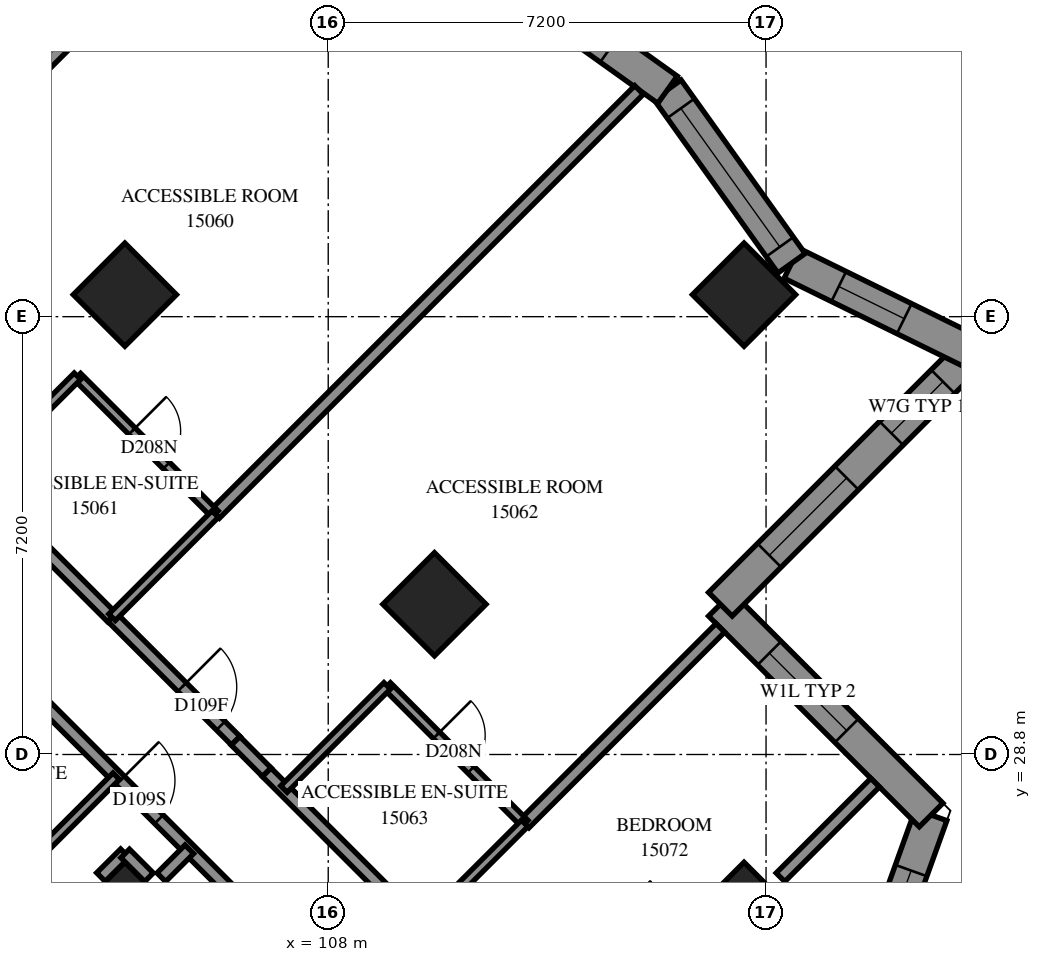
"""IFC4 building model, lengths in metres.
Left out: names, types, materials, properties, quantities, classifications, styles, units other than length and angle.
Written with IfcOpenShell. Run it as: python <this file> out.ifc"""

import sys

from ifc_helpers import new_model, si_unit, direction, frame, frame_2d, origin, origin_2d, place, context, subcontext, project, spatial, polyline, rectangle, outline, extrude, element, fill, save


model = new_model("IFC4")
c1 = context("Model", 3, precision=1e-05, world=origin(), true_north=direction((0.0, 1.0)))
c2 = subcontext(c1, "Body", "Model", "MODEL_VIEW")
j1 = project(units=[si_unit("LENGTHUNIT", "METRE"), si_unit("PLANEANGLEUNIT", "RADIAN")], contexts=[c1])
p1 = place(None, origin())
s1 = spatial("IfcSite", under=j1, at=p1, CompositionType="ELEMENT")
p2 = place(p1, origin())
s2 = spatial("IfcBuilding", under=s1, at=p2, CompositionType="ELEMENT")
p3 = place(p2, frame((0.0, 0.0, 57.6)))
s3 = spatial("IfcBuildingStorey", under=s2, at=p3, CompositionType="ELEMENT", Elevation=57.6)
for number, where, z_axis, x_axis in (
    (1, (104.656, 36.362, 0.0), (0.0, 0.0, 1.0), (0.707, -0.707, 0.0)),
    (2, (114.838, 36.362, 0.0), (0.0, 0.0, 1.0), (0.707, -0.707, 0.0)),
    (3, (109.747, 31.271, 0.0), (0.0, 0.0, 1.0), (0.707, -0.707, 0.0)),
    (4, (104.656, 26.18, 0.0), (0.0, 0.0, 1.0), (0.707, -0.707, 0.0)),
    (5, (114.838, 26.18, 0.0), (0.0, 0.0, 1.0), (0.707, -0.707, 0.0)),
):
    element("IfcColumn", number, at=place(p3, frame(where, z_axis=z_axis, x_axis=x_axis)), inside=s3, PredefinedType="COLUMN", context=c2, shape_type="SweptSolid", body=[
        extrude(rectangle(XDim=1.2, YDim=1.2, at=origin_2d()), origin(), (0.0, 0.0, 1.0), 3.1),
    ])
p4 = place(p3, frame((116.111, 22.788, 0.0), z_axis=(0.0, 0.0, 1.0), x_axis=(0.3382272757, 0.9410644558, 0.0)))
e6 = element("IfcWall", 6, at=p4, inside=s3, PredefinedType="SOLIDWALL", context=c2, shape_type="SweptSolid", body=[
    extrude(outline(polyline([(-0.124, -0.275), (5.506, -0.275), (5.157, 0.275), (0.124, 0.275), (-0.124, -0.275)])), origin(), (0.0, 0.0, 1.0), 3.1),
])
p5 = place(p4, frame((0.844, 0.0, 0.5)))
e7 = element("IfcOpeningElement", 7, at=p5, cuts=e6, PredefinedType="OPENING", context=c2, shape_type="SweptSolid", body=[
    extrude(rectangle(XDim=1.2, YDim=2.45, at=frame_2d((0.6, 1.225))), frame((0.0, 0.285, 0.0), z_axis=(0.0, -1.0, 0.0), x_axis=(1.0, 0.0, 0.0)), (0.0, 0.0, 1.0), 0.57),
])
p6 = place(p4, frame((3.16, 0.0, 0.5)))
e8 = element("IfcOpeningElement", 8, at=p6, cuts=e6, PredefinedType="OPENING", context=c2, shape_type="SweptSolid", body=[
    extrude(rectangle(XDim=1.2, YDim=2.45, at=frame_2d((0.6, 1.225))), frame((0.0, 0.285, 0.0), z_axis=(0.0, -1.0, 0.0), x_axis=(1.0, 0.0, 0.0)), (0.0, 0.0, 1.0), 0.57),
])
p7 = place(p3, frame((117.915, 27.805, 0.0), z_axis=(0.0, 0.0, 1.0), x_axis=(-0.7071067812, 0.7071067812, 0.0)))
e9 = element("IfcWall", 9, at=p7, inside=s3, PredefinedType="SOLIDWALL", context=c2, shape_type="SweptSolid", body=[
    extrude(outline(polyline([(-0.174, -0.275), (4.626, -0.275), (5.176, 0.275), (0.174, 0.275), (-0.174, -0.275)])), origin(), (0.0, 0.0, 1.0), 3.1),
])
p8 = place(p7, frame((1.963, 0.0, 0.6)))
e10 = element("IfcOpeningElement", 10, at=p8, cuts=e9, PredefinedType="OPENING", context=c2, shape_type="SweptSolid", body=[
    extrude(rectangle(XDim=1.8, YDim=1.9, at=frame_2d((0.9, 0.95))), frame((0.0, 0.285, 0.0), z_axis=(0.0, -1.0, 0.0), x_axis=(1.0, 0.0, 0.0)), (0.0, 0.0, 1.0), 0.57),
])
p9 = place(p3, frame((114.449, 31.271, 0.0), z_axis=(0.0, 0.0, 1.0), x_axis=(0.7070982526, 0.7071153096, 0.0)))
e11 = element("IfcWall", 11, at=p9, inside=s3, PredefinedType="SOLIDWALL", context=c2, shape_type="SweptSolid", body=[
    extrude(outline(polyline([(0.275, -0.275), (6.247, -0.275), (5.478, 0.275), (-0.275, 0.275), (0.275, -0.275)])), origin(), (0.0, 0.0, 1.0), 3.1),
])
p10 = place(p9, frame((1.137, 0.0, 0.6)))
e12 = element("IfcOpeningElement", 12, at=p10, cuts=e11, PredefinedType="OPENING", context=c2, shape_type="SweptSolid", body=[
    extrude(rectangle(XDim=1.8, YDim=1.9, at=frame_2d((0.9, 0.95))), frame((0.0, 0.285, 0.0), z_axis=(0.0, -1.0, 0.0), x_axis=(1.0, 0.0, 0.0)), (0.0, 0.0, 1.0), 0.57),
])
p11 = place(p9, frame((3.977, 0.0, 0.6)))
e13 = element("IfcOpeningElement", 13, at=p11, cuts=e11, PredefinedType="OPENING", context=c2, shape_type="SweptSolid", body=[
    extrude(rectangle(XDim=1.2, YDim=1.9, at=frame_2d((0.6, 0.95))), frame((0.0, 0.285, 0.0), z_axis=(0.0, -1.0, 0.0), x_axis=(1.0, 0.0, 0.0)), (0.0, 0.0, 1.0), 0.57),
])
p12 = place(p3, frame((118.595, 35.416, 0.0), z_axis=(0.0, 0.0, 1.0), x_axis=(-0.8975000889, 0.4410142747, 0.0)))
e14 = element("IfcWall", 14, at=p12, inside=s3, PredefinedType="SOLIDWALL", context=c2, shape_type="SweptSolid", body=[
    extrude(outline(polyline([(-0.384, -0.275), (3.246, -0.275), (3.385, 0.275), (0.384, 0.275), (-0.384, -0.275)])), origin(), (0.0, 0.0, 1.0), 3.1),
])
p13 = place(p12, frame((1.25, 0.0, 0.5)))
e15 = element("IfcOpeningElement", 15, at=p13, cuts=e14, PredefinedType="OPENING", context=c2, shape_type="SweptSolid", body=[
    extrude(rectangle(XDim=1.2, YDim=2.45, at=frame_2d((0.6, 1.225))), frame((0.0, 0.285, 0.0), z_axis=(0.0, -1.0, 0.0), x_axis=(1.0, 0.0, 0.0)), (0.0, 0.0, 1.0), 0.57),
])
p14 = place(p3, frame((115.619, 36.879, 0.0), z_axis=(0.0, 0.0, 1.0), x_axis=(-0.5814054054, 0.8136140083, 0.0)))
e16 = element("IfcWall", 16, at=p14, inside=s3, PredefinedType="SOLIDWALL", context=c2, shape_type="SweptSolid", body=[
    extrude(outline(polyline([(0.069, -0.275), (3.553, -0.275), (3.461, 0.275), (-0.069, 0.275), (0.069, -0.275)])), origin(), (0.0, 0.0, 1.0), 3.1),
])
p15 = place(p14, frame((0.331, 0.0, 0.5)))
e17 = element("IfcOpeningElement", 17, at=p15, cuts=e16, PredefinedType="OPENING", context=c2, shape_type="SweptSolid", body=[
    extrude(rectangle(XDim=2.8, YDim=2.45, at=frame_2d((1.4, 1.225))), frame((0.0, 0.285, 0.0), z_axis=(0.0, -1.0, 0.0), x_axis=(1.0, 0.0, 0.0)), (0.0, 0.0, 1.0), 0.57),
])
p16 = place(p3, frame((113.58, 39.732, 0.0), z_axis=(0.0, 0.0, 1.0), x_axis=(-0.8136209625, 0.5813956737, 0.0)))
e18 = element("IfcWall", 18, at=p16, inside=s3, PredefinedType="SOLIDWALL", context=c2, shape_type="SweptSolid", body=[
    extrude(outline(polyline([(-0.046, -0.275), (3.438, -0.275), (3.53, 0.275), (0.046, 0.275), (-0.046, -0.275)])), origin(), (0.0, 0.0, 1.0), 3.1),
])
p17 = place(p16, frame((1.165, 0.0, 0.5)))
e19 = element("IfcOpeningElement", 19, at=p17, cuts=e18, PredefinedType="OPENING", context=c2, shape_type="SweptSolid", body=[
    extrude(rectangle(XDim=1.2, YDim=2.45, at=frame_2d((0.6, 1.225))), frame((0.0, 0.285, 0.0), z_axis=(0.0, -1.0, 0.0), x_axis=(1.0, 0.0, 0.0)), (0.0, 0.0, 1.0), 0.57),
])
p18 = place(p3, frame((101.825, 31.125, 0.0), z_axis=(0.0, 0.0, 1.0), x_axis=(0.7071067812, -0.7071067812, 0.0)))
e20 = element("IfcWall", 20, at=p18, inside=s3, PredefinedType="PARTITIONING", context=c2, shape_type="SweptSolid", body=[
    extrude(rectangle(XDim=12.7, YDim=0.2, at=frame_2d((6.35, 0.0))), origin(), (0.0, 0.0, 1.0), 3.1),
])
p19 = place(p18, frame((3.895, 0.0, 0.0)))
e21 = element("IfcOpeningElement", 21, at=p19, cuts=e20, PredefinedType="OPENING", context=c2, shape_type="SweptSolid", body=[
    extrude(rectangle(XDim=0.9, YDim=2.1, at=frame_2d((0.45, 1.05))), frame((0.0, 0.11, 0.0), z_axis=(0.0, -1.0, 0.0), x_axis=(1.0, 0.0, 0.0)), (0.0, 0.0, 1.0), 0.22),
])
p20 = place(p18, frame((9.056, 0.0, 0.0)))
e22 = element("IfcOpeningElement", 22, at=p20, cuts=e20, PredefinedType="OPENING", context=c2, shape_type="SweptSolid", body=[
    extrude(rectangle(XDim=1.0, YDim=2.1, at=frame_2d((0.5, 1.05))), frame((0.0, 0.11, 0.0), z_axis=(0.0, -1.0, 0.0), x_axis=(1.0, 0.0, 0.0)), (0.0, 0.0, 1.0), 0.22),
])
p21 = place(p3, frame((106.14, 32.756, 0.0), z_axis=(0.0, 0.0, 1.0), x_axis=(0.7071067812, 0.7071067812, 0.0)))
e23 = element("IfcWall", 23, at=p21, inside=s3, PredefinedType="PARTITIONING", context=c2, shape_type="SweptSolid", body=[
    extrude(rectangle(XDim=9.86, YDim=0.2, at=frame_2d((4.93, 0.0))), origin(), (0.0, 0.0, 1.0), 3.1),
])
p22 = place(p3, frame((101.049, 37.847, 0.0), z_axis=(0.0, 0.0, 1.0), x_axis=(0.7071067812, 0.7071067812, 0.0)))
e24 = element("IfcWall", 24, at=p22, inside=s3, PredefinedType="PARTITIONING", context=c2, shape_type="SweptSolid", body=[
    extrude(rectangle(XDim=9.806, YDim=0.2, at=frame_2d((4.903, 0.0))), origin(), (0.0, 0.0, 1.0), 3.1),
])
p23 = place(p3, frame((99.349, 36.147, 0.0), z_axis=(0.0, 0.0, 1.0), x_axis=(0.7071067812, -0.7071067812, 0.0)))
e25 = element("IfcWall", 25, at=p23, inside=s3, PredefinedType="PARTITIONING", context=c2, shape_type="SweptSolid", body=[
    extrude(rectangle(XDim=7.201, YDim=0.2, at=frame_2d((3.601, 0.0))), origin(), (0.0, 0.0, 1.0), 3.1),
])
p24 = place(p23, frame((2.358, 0.0, 0.0)))
e26 = element("IfcOpeningElement", 26, at=p24, cuts=e25, PredefinedType="OPENING", context=c2, shape_type="SweptSolid", body=[
    extrude(rectangle(XDim=0.9, YDim=2.1, at=frame_2d((0.45, 1.05))), frame((0.0, 0.11, 0.0), z_axis=(0.0, -1.0, 0.0), x_axis=(1.0, 0.0, 0.0)), (0.0, 0.0, 1.0), 0.22),
])
p25 = place(p3, frame((106.987, 28.509, 0.0), z_axis=(0.0, 0.0, 1.0), x_axis=(0.7071067812, -0.7071067812, 0.0)))
e27 = element("IfcWall", 27, at=p25, inside=s3, PredefinedType="PARTITIONING", context=c2, shape_type="SweptSolid", body=[
    extrude(rectangle(XDim=7.198, YDim=0.2, at=frame_2d((3.599, 0.0))), origin(), (0.0, 0.0, 1.0), 3.1),
])
p26 = place(p25, frame((4.004, 0.0, 0.0)))
e28 = element("IfcOpeningElement", 28, at=p26, cuts=e27, PredefinedType="OPENING", context=c2, shape_type="SweptSolid", body=[
    extrude(rectangle(XDim=0.9, YDim=2.1, at=frame_2d((0.45, 1.05))), frame((0.0, 0.11, 0.0), z_axis=(0.0, -1.0, 0.0), x_axis=(1.0, 0.0, 0.0)), (0.0, 0.0, 1.0), 0.22),
])
p27 = place(p3, frame((111.231, 27.665, 0.0), z_axis=(0.0, 0.0, 1.0), x_axis=(0.7071067812, 0.7071067812, 0.0)))
e29 = element("IfcWall", 29, at=p27, inside=s3, PredefinedType="PARTITIONING", context=c2, shape_type="SweptSolid", body=[
    extrude(rectangle(XDim=4.55, YDim=0.2, at=frame_2d((2.275, 0.0))), origin(), (0.0, 0.0, 1.0), 3.1),
])
p28 = place(p3, frame((108.97, 29.928, 0.0), z_axis=(0.0, 0.0, 1.0), x_axis=(0.7067942478, -0.7074191764, 0.0)))
e30 = element("IfcWall", 30, at=p28, inside=s3, PredefinedType="PARTITIONING", context=c2, shape_type="SweptSolid", body=[
    extrude(rectangle(XDim=3.2, YDim=0.15, at=frame_2d((1.6, 0.0))), origin(), (0.0, 0.0, 1.0), 3.1),
])
p29 = place(p28, frame((1.148, 0.0, 0.0)))
e31 = element("IfcOpeningElement", 31, at=p29, cuts=e30, PredefinedType="OPENING", context=c2, shape_type="SweptSolid", body=[
    extrude(rectangle(XDim=0.8, YDim=2.1, at=frame_2d((0.4, 1.05))), frame((0.0, 0.085, 0.0), z_axis=(0.0, -1.0, 0.0), x_axis=(1.0, 0.0, 0.0)), (0.0, 0.0, 1.0), 0.17),
])
p30 = place(p3, frame((103.875, 35.015, 0.0), z_axis=(0.0, 0.0, 1.0), x_axis=(0.7071067812, -0.7071067812, 0.0)))
e32 = element("IfcWall", 32, at=p30, inside=s3, PredefinedType="PARTITIONING", context=c2, shape_type="SweptSolid", body=[
    extrude(rectangle(XDim=3.199, YDim=0.15, at=frame_2d((1.599, 0.0))), origin(), (0.0, 0.0, 1.0), 3.1),
])
p31 = place(p30, frame((1.27, 0.0, 0.0)))
e33 = element("IfcOpeningElement", 33, at=p31, cuts=e32, PredefinedType="OPENING", context=c2, shape_type="SweptSolid", body=[
    extrude(rectangle(XDim=0.8, YDim=2.1, at=frame_2d((0.4, 1.05))), frame((0.0, 0.085, 0.0), z_axis=(0.0, -1.0, 0.0), x_axis=(1.0, 0.0, 0.0)), (0.0, 0.0, 1.0), 0.17),
])
p32 = place(p3, frame((104.445, 31.059, 0.0), z_axis=(0.0, 0.0, 1.0), x_axis=(0.7074545101, -0.7067588812, 0.0)))
e34 = element("IfcWall", 34, at=p32, inside=s3, PredefinedType="PARTITIONING", context=c2, shape_type="SweptSolid", body=[
    extrude(rectangle(XDim=2.875, YDim=0.2, at=frame_2d((1.438, 0.0))), origin(), (0.0, 0.0, 1.0), 3.1),
])
p33 = place(p32, frame((1.626, 0.0, 0.0)))
e35 = element("IfcOpeningElement", 35, at=p33, cuts=e34, PredefinedType="OPENING", context=c2, shape_type="SweptSolid", body=[
    extrude(rectangle(XDim=0.9, YDim=2.1, at=frame_2d((0.45, 1.05))), frame((0.0, 0.11, 0.0), z_axis=(0.0, -1.0, 0.0), x_axis=(1.0, 0.0, 0.0)), (0.0, 0.0, 1.0), 0.22),
])
p34 = place(p3, frame((107.271, 28.231, 0.0), z_axis=(0.0, 0.0, 1.0), x_axis=(0.7071067812, 0.7071067812, 0.0)))
e36 = element("IfcWall", 36, at=p34, inside=s3, PredefinedType="PARTITIONING", context=c2, shape_type="SweptSolid", body=[
    extrude(rectangle(XDim=2.401, YDim=0.15, at=frame_2d((1.201, 0.0))), origin(), (0.0, 0.0, 1.0), 3.1),
])
for number, where, z_axis, x_axis in (
    (37, (104.445, 31.057, 0.0), (0.0, 0.0, 1.0), (0.707, 0.708, 0.0)),
    (38, (102.177, 33.325, 0.0), (0.0, 0.0, 1.0), (0.708, 0.707, 0.0)),
    (39, (109.531, 25.971, 0.0), (0.0, 0.0, 1.0), (0.708, 0.707, 0.0)),
):
    element("IfcWall", number, at=place(p3, frame(where, z_axis=z_axis, x_axis=x_axis)), inside=s3, PredefinedType="PARTITIONING", context=c2, shape_type="SweptSolid", body=[
        extrude(rectangle(XDim=2.4, YDim=0.15, at=frame_2d((1.2, 0.0))), origin(), (0.0, 0.0, 1.0), 3.1),
    ])
p35 = place(p3, frame((102.817, 26.747, 0.0), z_axis=(0.0, 0.0, 1.0), x_axis=(0.7071067812, 0.7071067812, 0.0)))
e40 = element("IfcWall", 40, at=p35, inside=s3, PredefinedType="PARTITIONING", context=c2, shape_type="SweptSolid", body=[
    extrude(rectangle(XDim=2.398, YDim=0.15, at=frame_2d((1.199, 0.0))), origin(), (0.0, 0.0, 1.0), 3.1),
])
p36 = place(p3, frame((115.438, 26.78, 0.0), z_axis=(0.0, 0.0, 1.0), x_axis=(0.7071067812, 0.7071067812, 0.0)))
e41 = element("IfcWall", 41, at=p36, inside=s3, PredefinedType="PARTITIONING", context=c2, shape_type="SweptSolid", body=[
    extrude(rectangle(XDim=2.201, YDim=0.2, at=frame_2d((1.101, 0.0))), origin(), (0.0, 0.0, 1.0), 3.1),
])
p37 = place(p3, frame((106.476, 29.024, 0.0), z_axis=(0.0, 0.0, 1.0), x_axis=(0.7057270646, -0.7084838109, 0.0)))
e42 = element("IfcWall", 42, at=p37, inside=s3, PredefinedType="PARTITIONING", context=c2, shape_type="SweptSolid", body=[
    extrude(rectangle(XDim=0.726, YDim=0.2, at=frame_2d((0.363, 0.0))), origin(), (0.0, 0.0, 1.0), 3.1),
])
p38 = place(p3, frame((105.255, 26.781, 0.0), z_axis=(0.0, 0.0, 1.0), x_axis=(0.7071067812, 0.7071067812, 0.0)))
e43 = element("IfcWall", 43, at=p38, inside=s3, PredefinedType="PARTITIONING", context=c2, shape_type="SweptSolid", body=[
    extrude(rectangle(XDim=0.65, YDim=0.2, at=frame_2d((0.325, 0.0))), origin(), (0.0, 0.0, 1.0), 3.1),
])
p39 = place(p3, frame((104.263, 26.784, 0.0), z_axis=(0.0, 0.0, 1.0), x_axis=(0.7089037401, 0.705305244, 0.0)))
e44 = element("IfcWall", 44, at=p39, inside=s3, PredefinedType="PARTITIONING", context=c2, shape_type="SweptSolid", body=[
    extrude(rectangle(XDim=0.556, YDim=0.2, at=frame_2d((0.278, 0.0))), origin(), (0.0, 0.0, 1.0), 3.1),
])
p40 = place(p3, frame((104.66, 27.172, 0.0), z_axis=(0.0, 0.0, 1.0), x_axis=(0.7071067812, -0.7071067812, 0.0)))
e45 = element("IfcWall", 45, at=p40, inside=s3, PredefinedType="PARTITIONING", context=c2, shape_type="SweptSolid", body=[
    extrude(rectangle(XDim=0.554, YDim=0.2, at=frame_2d((0.277, 0.0))), origin(), (0.0, 0.0, 1.0), 3.1),
])
p41 = place(p6, origin())
e46 = element("IfcWindow", 46, at=p41, inside=s3, PartitioningType="SINGLE_PANEL", PredefinedType="WINDOW", context=c2, shape_type="SweptSolid", body=[
    extrude(rectangle(XDim=1.2, YDim=2.45, at=frame_2d((0.6, 1.225))), frame((0.0, 0.155, 0.0), z_axis=(0.0, -1.0, 0.0), x_axis=(1.0, 0.0, 0.0)), (0.0, 0.0, 1.0), 0.06),
])
fill(e8, e46)
p42 = place(p8, origin())
e47 = element("IfcWindow", 47, at=p42, inside=s3, PartitioningType="SINGLE_PANEL", PredefinedType="WINDOW", context=c2, shape_type="SweptSolid", body=[
    extrude(rectangle(XDim=1.8, YDim=1.9, at=frame_2d((0.9, 0.95))), frame((0.0, 0.155, 0.0), z_axis=(0.0, -1.0, 0.0), x_axis=(1.0, 0.0, 0.0)), (0.0, 0.0, 1.0), 0.06),
])
fill(e10, e47)
p43 = place(p10, origin())
e48 = element("IfcWindow", 48, at=p43, inside=s3, PartitioningType="SINGLE_PANEL", PredefinedType="WINDOW", context=c2, shape_type="SweptSolid", body=[
    extrude(rectangle(XDim=1.8, YDim=1.9, at=frame_2d((0.9, 0.95))), frame((0.0, 0.155, 0.0), z_axis=(0.0, -1.0, 0.0), x_axis=(1.0, 0.0, 0.0)), (0.0, 0.0, 1.0), 0.06),
])
fill(e12, e48)
p44 = place(p11, origin())
e49 = element("IfcWindow", 49, at=p44, inside=s3, PartitioningType="SINGLE_PANEL", PredefinedType="WINDOW", context=c2, shape_type="SweptSolid", body=[
    extrude(rectangle(XDim=1.2, YDim=1.9, at=frame_2d((0.6, 0.95))), frame((0.0, 0.155, 0.0), z_axis=(0.0, -1.0, 0.0), x_axis=(1.0, 0.0, 0.0)), (0.0, 0.0, 1.0), 0.06),
])
fill(e13, e49)
p45 = place(p13, origin())
e50 = element("IfcWindow", 50, at=p45, inside=s3, PartitioningType="SINGLE_PANEL", PredefinedType="WINDOW", context=c2, shape_type="SweptSolid", body=[
    extrude(rectangle(XDim=1.2, YDim=2.45, at=frame_2d((0.6, 1.225))), frame((0.0, 0.155, 0.0), z_axis=(0.0, -1.0, 0.0), x_axis=(1.0, 0.0, 0.0)), (0.0, 0.0, 1.0), 0.06),
])
fill(e15, e50)
p46 = place(p15, origin())
e51 = element("IfcWindow", 51, at=p46, inside=s3, PartitioningType="SINGLE_PANEL", PredefinedType="WINDOW", context=c2, shape_type="SweptSolid", body=[
    extrude(rectangle(XDim=2.8, YDim=2.45, at=frame_2d((1.4, 1.225))), frame((0.0, 0.155, 0.0), z_axis=(0.0, -1.0, 0.0), x_axis=(1.0, 0.0, 0.0)), (0.0, 0.0, 1.0), 0.06),
])
fill(e17, e51)
p47 = place(p17, origin())
e52 = element("IfcWindow", 52, at=p47, inside=s3, PartitioningType="SINGLE_PANEL", PredefinedType="WINDOW", context=c2, shape_type="SweptSolid", body=[
    extrude(rectangle(XDim=1.2, YDim=2.45, at=frame_2d((0.6, 1.225))), frame((0.0, 0.155, 0.0), z_axis=(0.0, -1.0, 0.0), x_axis=(1.0, 0.0, 0.0)), (0.0, 0.0, 1.0), 0.06),
])
fill(e19, e52)
p48 = place(p31, origin())
e53 = element("IfcDoor", 53, at=p48, inside=s3, OperationType="SINGLE_SWING_RIGHT", PredefinedType="DOOR", context=c2, shape_type="SweptSolid", body=[
    extrude(rectangle(XDim=0.8, YDim=2.1, at=frame_2d((0.4, 1.05))), frame((0.0, 0.025, 0.0), z_axis=(0.0, -1.0, 0.0), x_axis=(1.0, 0.0, 0.0)), (0.0, 0.0, 1.0), 0.05),
])
fill(e33, e53)
p49 = place(p33, origin())
e54 = element("IfcDoor", 54, at=p49, inside=s3, OperationType="SINGLE_SWING_RIGHT", PredefinedType="DOOR", context=c2, shape_type="SweptSolid", body=[
    extrude(rectangle(XDim=0.9, YDim=2.1, at=frame_2d((0.45, 1.05))), frame((0.0, 0.025, 0.0), z_axis=(0.0, -1.0, 0.0), x_axis=(1.0, 0.0, 0.0)), (0.0, 0.0, 1.0), 0.05),
])
fill(e35, e54)
p50 = place(p29, origin())
e55 = element("IfcDoor", 55, at=p50, inside=s3, OperationType="SINGLE_SWING_RIGHT", PredefinedType="DOOR", context=c2, shape_type="SweptSolid", body=[
    extrude(rectangle(XDim=0.8, YDim=2.1, at=frame_2d((0.4, 1.05))), frame((0.0, 0.025, 0.0), z_axis=(0.0, -1.0, 0.0), x_axis=(1.0, 0.0, 0.0)), (0.0, 0.0, 1.0), 0.05),
])
fill(e31, e55)
p51 = place(p19, origin())
e56 = element("IfcDoor", 56, at=p51, inside=s3, OperationType="SINGLE_SWING_LEFT", PredefinedType="DOOR", context=c2, shape_type="SweptSolid", body=[
    extrude(rectangle(XDim=0.9, YDim=2.1, at=frame_2d((0.45, 1.05))), frame((0.0, 0.025, 0.0), z_axis=(0.0, -1.0, 0.0), x_axis=(1.0, 0.0, 0.0)), (0.0, 0.0, 1.0), 0.05),
])
fill(e21, e56)
save(model, sys.argv[1])
